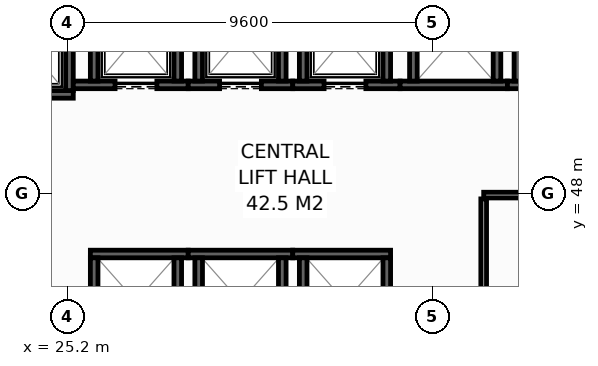
"""IFC4 building model, lengths in metres.
Left out: names, types, materials, properties, quantities, classifications, styles, units other than length and angle.
Written with IfcOpenShell. Run it as: python <this file> out.ifc"""

import sys

from ifc_helpers import new_model, si_unit, direction, frame, frame_2d, origin, place, context, subcontext, project, spatial, rectangle, extrude, element, fill, save


model = new_model("IFC4")
c1 = context("Model", 3, precision=1e-05, world=origin(), true_north=direction((0.0, 1.0)))
c2 = subcontext(c1, "Body", "Model", "MODEL_VIEW")
j1 = project(units=[si_unit("LENGTHUNIT", "METRE"), si_unit("PLANEANGLEUNIT", "RADIAN")], contexts=[c1])
p1 = place(None, origin())
s1 = spatial("IfcSite", under=j1, at=p1, CompositionType="ELEMENT")
p2 = place(p1, origin())
s2 = spatial("IfcBuilding", under=s1, at=p2, CompositionType="ELEMENT")
p3 = place(p2, frame((0.0, 0.0, 60.4)))
s3 = spatial("IfcBuildingStorey", under=s2, at=p3, CompositionType="ELEMENT", Elevation=60.4)
p4 = place(p3, frame((22.5, 50.6, 0.0), z_axis=(0.0, 0.0, 1.0), x_axis=(1.0, 0.0, 0.0)))
e1 = element("IfcWall", 1, at=p4, inside=s3, PredefinedType="SHEAR", context=c2, shape_type="SweptSolid", body=[
    extrude(rectangle(XDim=2.85, YDim=0.2, at=frame_2d((1.425, 0.0))), origin(), (0.0, 0.0, 1.0), 4.15),
])
p5 = place(p4, frame((0.925, 0.0, 0.0)))
e2 = element("IfcOpeningElement", 2, at=p5, cuts=e1, PredefinedType="OPENING", context=c2, shape_type="SweptSolid", body=[
    extrude(rectangle(XDim=1.25, YDim=2.3, at=frame_2d((0.625, 1.15))), frame((0.0, 0.11, 0.0), z_axis=(0.0, -1.0, 0.0), x_axis=(1.0, 0.0, 0.0)), (0.0, 0.0, 1.0), 0.22),
])
p6 = place(p3, frame((25.25, 50.7, 0.0), z_axis=(0.0, 0.0, 1.0), x_axis=(0.0, 1.0, 0.0)))
e3 = element("IfcWall", 3, at=p6, inside=s3, PredefinedType="SHEAR", context=c2, shape_type="SweptSolid", body=[
    extrude(rectangle(XDim=2.6, YDim=0.2, at=frame_2d((1.3, 0.0))), origin(), (0.0, 0.0, 1.0), 4.15),
])
p7 = place(p3, frame((25.35, 50.85, 0.0), z_axis=(0.0, 0.0, 1.0), x_axis=(1.0, 0.0, 0.0)))
e4 = element("IfcWall", 4, at=p7, inside=s3, PredefinedType="SHEAR", context=c2, shape_type="SweptSolid", body=[
    extrude(rectangle(XDim=3.025, YDim=0.2, at=frame_2d((1.512, 0.0))), origin(), (0.0, 0.0, 1.0), 4.15),
])
p8 = place(p7, frame((1.1, 0.0, 0.0)))
e5 = element("IfcOpeningElement", 5, at=p8, cuts=e4, PredefinedType="OPENING", context=c2, shape_type="SweptSolid", body=[
    extrude(rectangle(XDim=1.1, YDim=2.2, at=frame_2d((0.55, 1.1))), frame((0.0, 0.11, 0.0), z_axis=(0.0, -1.0, 0.0), x_axis=(1.0, 0.0, 0.0)), (0.0, 0.0, 1.0), 0.22),
])
for number, where, z_axis, x_axis in (
    (6, (25.9, 50.95, 0.0), (0.0, 0.0, 1.0), (0.0, 1.0, 0.0)),
    (7, (28.1, 50.95, 0.0), (0.0, 0.0, 1.0), (0.0, 1.0, 0.0)),
):
    element("IfcWall", number, at=place(p3, frame(where, z_axis=z_axis, x_axis=x_axis)), inside=s3, PredefinedType="SHEAR", context=c2, shape_type="SweptSolid", body=[
        extrude(rectangle(XDim=2.3, YDim=0.2, at=frame_2d((1.15, 0.0))), origin(), (0.0, 0.0, 1.0), 4.15),
    ])
p9 = place(p3, frame((28.375, 50.85, 0.0), z_axis=(0.0, 0.0, 1.0), x_axis=(1.0, 0.0, 0.0)))
e8 = element("IfcWall", 8, at=p9, inside=s3, PredefinedType="SHEAR", context=c2, shape_type="SweptSolid", body=[
    extrude(rectangle(XDim=2.75, YDim=0.2, at=frame_2d((1.375, 0.0))), origin(), (0.0, 0.0, 1.0), 4.15),
])
p10 = place(p9, frame((0.825, 0.0, 0.0)))
e9 = element("IfcOpeningElement", 9, at=p10, cuts=e8, PredefinedType="OPENING", context=c2, shape_type="SweptSolid", body=[
    extrude(rectangle(XDim=1.1, YDim=2.2, at=frame_2d((0.55, 1.1))), frame((0.0, 0.11, 0.0), z_axis=(0.0, -1.0, 0.0), x_axis=(1.0, 0.0, 0.0)), (0.0, 0.0, 1.0), 0.22),
])
for number, where, z_axis, x_axis in (
    (10, (28.65, 50.95, 0.0), (0.0, 0.0, 1.0), (0.0, 1.0, 0.0)),
    (11, (30.85, 50.95, 0.0), (0.0, 0.0, 1.0), (0.0, 1.0, 0.0)),
):
    element("IfcWall", number, at=place(p3, frame(where, z_axis=z_axis, x_axis=x_axis)), inside=s3, PredefinedType="SHEAR", context=c2, shape_type="SweptSolid", body=[
        extrude(rectangle(XDim=2.3, YDim=0.2, at=frame_2d((1.15, 0.0))), origin(), (0.0, 0.0, 1.0), 4.15),
    ])
p11 = place(p3, frame((31.125, 50.85, 0.0), z_axis=(0.0, 0.0, 1.0), x_axis=(1.0, 0.0, 0.0)))
e12 = element("IfcWall", 12, at=p11, inside=s3, PredefinedType="SHEAR", context=c2, shape_type="SweptSolid", body=[
    extrude(rectangle(XDim=2.825, YDim=0.2, at=frame_2d((1.413, 0.0))), origin(), (0.0, 0.0, 1.0), 4.15),
])
p12 = place(p11, frame((0.825, 0.0, 0.0)))
e13 = element("IfcOpeningElement", 13, at=p12, cuts=e12, PredefinedType="OPENING", context=c2, shape_type="SweptSolid", body=[
    extrude(rectangle(XDim=1.1, YDim=2.2, at=frame_2d((0.55, 1.1))), frame((0.0, 0.11, 0.0), z_axis=(0.0, -1.0, 0.0), x_axis=(1.0, 0.0, 0.0)), (0.0, 0.0, 1.0), 0.22),
])
for number, where, z_axis, x_axis in (
    (14, (31.4, 50.95, 0.0), (0.0, 0.0, 1.0), (0.0, 1.0, 0.0)),
    (15, (33.6, 50.95, 0.0), (0.0, 0.0, 1.0), (0.0, 1.0, 0.0)),
):
    element("IfcWall", number, at=place(p3, frame(where, z_axis=z_axis, x_axis=x_axis)), inside=s3, PredefinedType="SHEAR", context=c2, shape_type="SweptSolid", body=[
        extrude(rectangle(XDim=2.3, YDim=0.2, at=frame_2d((1.15, 0.0))), origin(), (0.0, 0.0, 1.0), 4.15),
    ])
p13 = place(p3, frame((25.8, 46.4, 0.0), z_axis=(0.0, 0.0, 1.0), x_axis=(1.0, 0.0, 0.0)))
e16 = element("IfcWall", 16, at=p13, inside=s3, PredefinedType="SHEAR", context=c2, shape_type="SweptSolid", body=[
    extrude(rectangle(XDim=2.575, YDim=0.2, at=frame_2d((1.288, 0.0))), origin(), (0.0, 0.0, 1.0), 4.15),
])
for number, where, z_axis, x_axis in (
    (17, (25.9, 44.0, 0.0), (0.0, 0.0, 1.0), (0.0, 1.0, 0.0)),
    (18, (28.1, 44.0, 0.0), (0.0, 0.0, 1.0), (0.0, 1.0, 0.0)),
):
    element("IfcWall", number, at=place(p3, frame(where, z_axis=z_axis, x_axis=x_axis)), inside=s3, PredefinedType="SHEAR", context=c2, shape_type="SweptSolid", body=[
        extrude(rectangle(XDim=2.3, YDim=0.2, at=frame_2d((1.15, 0.0))), origin(), (0.0, 0.0, 1.0), 4.15),
    ])
p14 = place(p3, frame((28.375, 46.4, 0.0), z_axis=(0.0, 0.0, 1.0), x_axis=(1.0, 0.0, 0.0)))
e19 = element("IfcWall", 19, at=p14, inside=s3, PredefinedType="SHEAR", context=c2, shape_type="SweptSolid", body=[
    extrude(rectangle(XDim=2.75, YDim=0.2, at=frame_2d((1.375, 0.0))), origin(), (0.0, 0.0, 1.0), 4.15),
])
for number, where, z_axis, x_axis in (
    (20, (28.65, 44.0, 0.0), (0.0, 0.0, 1.0), (0.0, 1.0, 0.0)),
    (21, (30.85, 44.0, 0.0), (0.0, 0.0, 1.0), (0.0, 1.0, 0.0)),
):
    element("IfcWall", number, at=place(p3, frame(where, z_axis=z_axis, x_axis=x_axis)), inside=s3, PredefinedType="SHEAR", context=c2, shape_type="SweptSolid", body=[
        extrude(rectangle(XDim=2.3, YDim=0.2, at=frame_2d((1.15, 0.0))), origin(), (0.0, 0.0, 1.0), 4.15),
    ])
p15 = place(p3, frame((31.125, 46.4, 0.0), z_axis=(0.0, 0.0, 1.0), x_axis=(1.0, 0.0, 0.0)))
e22 = element("IfcWall", 22, at=p15, inside=s3, PredefinedType="SHEAR", context=c2, shape_type="SweptSolid", body=[
    extrude(rectangle(XDim=2.575, YDim=0.2, at=frame_2d((1.288, 0.0))), origin(), (0.0, 0.0, 1.0), 4.15),
])
for number, where, z_axis, x_axis in (
    (23, (31.4, 44.0, 0.0), (0.0, 0.0, 1.0), (0.0, 1.0, 0.0)),
    (24, (33.6, 44.0, 0.0), (0.0, 0.0, 1.0), (0.0, 1.0, 0.0)),
):
    element("IfcWall", number, at=place(p3, frame(where, z_axis=z_axis, x_axis=x_axis)), inside=s3, PredefinedType="SHEAR", context=c2, shape_type="SweptSolid", body=[
        extrude(rectangle(XDim=2.3, YDim=0.2, at=frame_2d((1.15, 0.0))), origin(), (0.0, 0.0, 1.0), 4.15),
    ])
p16 = place(p3, frame((33.95, 50.85, 0.0), z_axis=(0.0, 0.0, 1.0), x_axis=(1.0, 0.0, 0.0)))
e25 = element("IfcWall", 25, at=p16, inside=s3, PredefinedType="SHEAR", context=c2, shape_type="SweptSolid", body=[
    extrude(rectangle(XDim=2.825, YDim=0.2, at=frame_2d((1.413, 0.0))), origin(), (0.0, 0.0, 1.0), 4.15),
])
for number, where, z_axis, x_axis in (
    (26, (34.3, 50.95, 0.0), (0.0, 0.0, 1.0), (0.0, 1.0, 0.0)),
    (27, (36.5, 50.95, 0.0), (0.0, 0.0, 1.0), (0.0, 1.0, 0.0)),
):
    element("IfcWall", number, at=place(p3, frame(where, z_axis=z_axis, x_axis=x_axis)), inside=s3, PredefinedType="SHEAR", context=c2, shape_type="SweptSolid", body=[
        extrude(rectangle(XDim=2.3, YDim=0.2, at=frame_2d((1.15, 0.0))), origin(), (0.0, 0.0, 1.0), 4.15),
    ])
p17 = place(p3, frame((36.775, 50.85, 0.0), z_axis=(0.0, 0.0, 1.0), x_axis=(1.0, 0.0, 0.0)))
e28 = element("IfcWall", 28, at=p17, inside=s3, PredefinedType="SHEAR", context=c2, shape_type="SweptSolid", body=[
    extrude(rectangle(XDim=2.75, YDim=0.2, at=frame_2d((1.375, 0.0))), origin(), (0.0, 0.0, 1.0), 4.15),
])
p18 = place(p3, frame((37.05, 50.95, 0.0), z_axis=(0.0, 0.0, 1.0), x_axis=(0.0, 1.0, 0.0)))
e29 = element("IfcWall", 29, at=p18, inside=s3, PredefinedType="SHEAR", context=c2, shape_type="SweptSolid", body=[
    extrude(rectangle(XDim=2.3, YDim=0.2, at=frame_2d((1.15, 0.0))), origin(), (0.0, 0.0, 1.0), 4.15),
])
p19 = place(p3, frame((36.15, 47.95, 0.0), z_axis=(0.0, 0.0, 1.0), x_axis=(1.0, 0.0, 0.0)))
e30 = element("IfcWall", 30, at=p19, inside=s3, PredefinedType="PARTITIONING", context=c2, shape_type="SweptSolid", body=[
    extrude(rectangle(XDim=6.35, YDim=0.15, at=frame_2d((3.175, 0.0))), origin(), (0.0, 0.0, 1.0), 4.15),
])
p20 = place(p3, frame((36.15, 45.22, 0.0), z_axis=(0.0, 0.0, 1.0), x_axis=(0.0, 1.0, 0.0)))
e31 = element("IfcWall", 31, at=p20, inside=s3, PredefinedType="PARTITIONING", context=c2, shape_type="SweptSolid", body=[
    extrude(rectangle(XDim=2.63, YDim=0.15, at=frame_2d((1.315, 0.0))), origin(), (0.0, 0.0, 1.0), 4.15),
])
p21 = place(p8, origin())
e32 = element("IfcDoor", 32, at=p21, inside=s3, OperationType="SLIDING_TO_LEFT", PredefinedType="DOOR", context=c2, shape_type="SweptSolid", body=[
    extrude(rectangle(XDim=1.1, YDim=2.2, at=frame_2d((0.55, 1.1))), frame((0.0, 0.025, 0.0), z_axis=(0.0, -1.0, 0.0), x_axis=(1.0, 0.0, 0.0)), (0.0, 0.0, 1.0), 0.05),
])
fill(e5, e32)
p22 = place(p10, origin())
e33 = element("IfcDoor", 33, at=p22, inside=s3, OperationType="SLIDING_TO_LEFT", PredefinedType="DOOR", context=c2, shape_type="SweptSolid", body=[
    extrude(rectangle(XDim=1.1, YDim=2.2, at=frame_2d((0.55, 1.1))), frame((0.0, 0.025, 0.0), z_axis=(0.0, -1.0, 0.0), x_axis=(1.0, 0.0, 0.0)), (0.0, 0.0, 1.0), 0.05),
])
fill(e9, e33)
p23 = place(p12, origin())
e34 = element("IfcDoor", 34, at=p23, inside=s3, OperationType="SLIDING_TO_LEFT", PredefinedType="DOOR", context=c2, shape_type="SweptSolid", body=[
    extrude(rectangle(XDim=1.1, YDim=2.2, at=frame_2d((0.55, 1.1))), frame((0.0, 0.025, 0.0), z_axis=(0.0, -1.0, 0.0), x_axis=(1.0, 0.0, 0.0)), (0.0, 0.0, 1.0), 0.05),
])
fill(e13, e34)
save(model, sys.argv[1])
